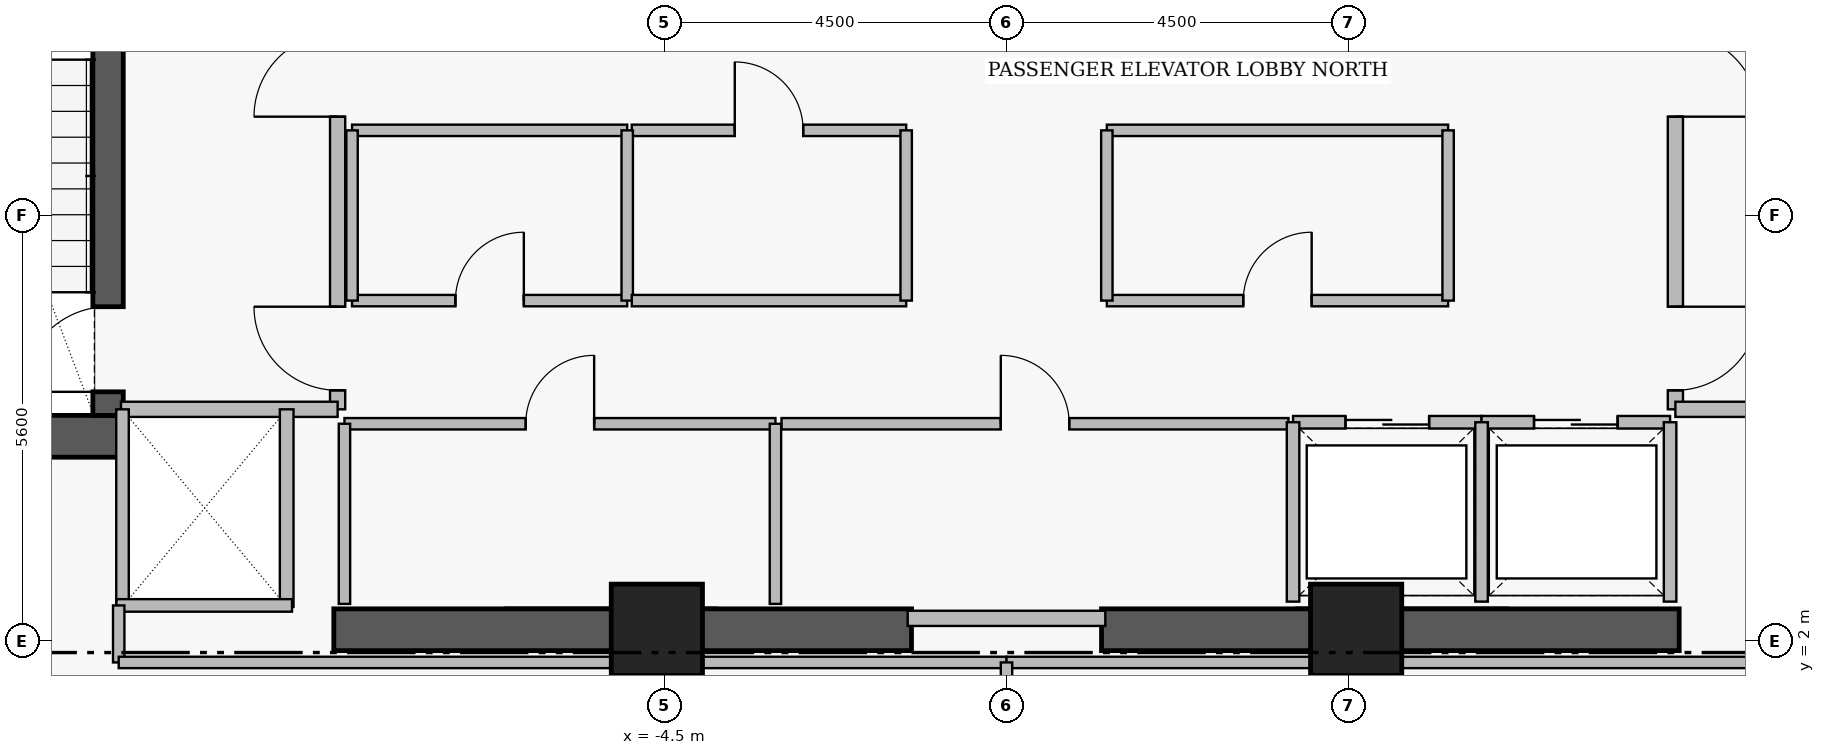
"""IFC4 building model, lengths in metres.
Left out: names, types, materials, properties, quantities, classifications, styles, units other than length and angle.
Written with IfcOpenShell. Run it as: python <this file> out.ifc"""

import sys

from ifc_helpers import new_model, si_unit, direction, frame, frame_2d, origin, origin_2d, place, context, subcontext, project, spatial, rectangle, extrude, element, fill, save


model = new_model("IFC4")
c1 = context("Model", 3, precision=1e-05, world=origin(), true_north=direction((0.0, 1.0)))
c2 = subcontext(c1, "Body", "Model", "MODEL_VIEW")
j1 = project(units=[si_unit("LENGTHUNIT", "METRE"), si_unit("PLANEANGLEUNIT", "RADIAN")], contexts=[c1])
p1 = place(None, origin())
s1 = spatial("IfcSite", under=j1, at=p1, CompositionType="ELEMENT")
p2 = place(p1, origin())
s2 = spatial("IfcBuilding", under=s1, at=p2, CompositionType="ELEMENT")
p3 = place(p2, frame((0.0, 0.0, 250.75)))
s3 = spatial("IfcBuildingStorey", under=s2, at=p3, CompositionType="ELEMENT", Elevation=250.75)
p4 = place(p3, frame((-15.96, 4.695, 0.0), z_axis=(0.0, 0.0, 1.0), x_axis=(1.0, 0.0, 0.0)))
e1 = element("IfcWall", 1, at=p4, inside=s3, PredefinedType="SHEAR", context=c2, shape_type="SweptSolid", body=[
    extrude(rectangle(XDim=4.36, YDim=0.55, at=frame_2d((2.18, 0.0))), origin(), (0.0, 0.0, 1.0), 3.51),
])
for number, where, z_axis, x_axis in (
    (2, (-8.85, 2.15, 0.0), (0.0, 0.0, 1.0), (1.0, 0.0, 0.0)),
    (3, (1.25, 2.15, 0.0), (0.0, 0.0, 1.0), (1.0, 0.0, 0.0)),
):
    element("IfcWall", number, at=place(p3, frame(where, z_axis=z_axis, x_axis=x_axis)), inside=s3, PredefinedType="SHEAR", context=c2, shape_type="SweptSolid", body=[
        extrude(rectangle(XDim=7.6, YDim=0.55, at=frame_2d((3.8, 0.0))), origin(), (0.0, 0.0, 1.0), 3.48),
    ])
p5 = place(p3, frame((-11.82, 4.97, 0.0), z_axis=(0.0, 0.0, 1.0), x_axis=(0.0, 1.0, 0.0)))
e4 = element("IfcWall", 4, at=p5, inside=s3, PredefinedType="SHEAR", context=c2, shape_type="SweptSolid", body=[
    extrude(rectangle(XDim=8.96, YDim=0.4, at=frame_2d((4.48, 0.0))), origin(), (0.0, 0.0, 1.0), 3.51),
])
p6 = place(p5, frame((0.31, 0.0, 0.0)))
e5 = element("IfcOpeningElement", 5, at=p6, cuts=e4, PredefinedType="OPENING", context=c2, shape_type="SweptSolid", body=[
    extrude(rectangle(XDim=1.12, YDim=2.22, at=frame_2d((0.56, 1.11))), frame((0.0, 0.21, 0.0), z_axis=(0.0, -1.0, 0.0), x_axis=(1.0, 0.0, 0.0)), (0.0, 0.0, 1.0), 0.42),
])
for number, where, z_axis, x_axis in (
    (6, (-4.6, 2.15, 0.0), (0.0, 0.0, 1.0), (1.0, 0.0, 0.0)),
    (7, (4.6, 2.15, 0.0), (0.0, 0.0, 1.0), (1.0, 0.0, 0.0)),
):
    element("IfcColumn", number, at=place(p3, frame(where, z_axis=z_axis, x_axis=x_axis)), inside=s3, PredefinedType="COLUMN", context=c2, shape_type="SweptSolid", body=[
        extrude(rectangle(XDim=1.2, YDim=1.2, at=origin_2d()), origin(), (0.0, 0.0, 1.0), 3.7),
    ])
p7 = place(p3, frame((-8.8, 5.05, 0.0), z_axis=(0.0, 0.0, 1.0), x_axis=(0.0, 1.0, 0.0)))
e8 = element("IfcWall", 8, at=p7, inside=s3, PredefinedType="PARTITIONING", context=c2, shape_type="SweptSolid", body=[
    extrude(rectangle(XDim=6.1, YDim=0.2, at=frame_2d((3.05, 0.0))), origin(), (0.0, 0.0, 1.0), 3.48),
])
p8 = place(p7, frame((0.25, 0.0, 0.0)))
e9 = element("IfcOpeningElement", 9, at=p8, cuts=e8, PredefinedType="OPENING", context=c2, shape_type="SweptSolid", body=[
    extrude(rectangle(XDim=1.1, YDim=2.2, at=frame_2d((0.55, 1.1))), frame((0.0, 0.11, 0.0), z_axis=(0.0, -1.0, 0.0), x_axis=(1.0, 0.0, 0.0)), (0.0, 0.0, 1.0), 0.22),
])
p9 = place(p7, frame((3.85, 0.0, 0.0)))
e10 = element("IfcOpeningElement", 10, at=p9, cuts=e8, PredefinedType="OPENING", context=c2, shape_type="SweptSolid", body=[
    extrude(rectangle(XDim=1.1, YDim=2.2, at=frame_2d((0.55, 1.1))), frame((0.0, 0.11, 0.0), z_axis=(0.0, -1.0, 0.0), x_axis=(1.0, 0.0, 0.0)), (0.0, 0.0, 1.0), 0.22),
])
p10 = place(p3, frame((8.8, 11.15, 0.0), z_axis=(0.0, 0.0, 1.0), x_axis=(0.0, -1.0, 0.0)))
e11 = element("IfcWall", 11, at=p10, inside=s3, PredefinedType="PARTITIONING", context=c2, shape_type="SweptSolid", body=[
    extrude(rectangle(XDim=6.1, YDim=0.2, at=frame_2d((3.05, 0.0))), origin(), (0.0, 0.0, 1.0), 3.48),
])
p11 = place(p10, frame((1.15, 0.0, 0.0)))
e12 = element("IfcOpeningElement", 12, at=p11, cuts=e11, PredefinedType="OPENING", context=c2, shape_type="SweptSolid", body=[
    extrude(rectangle(XDim=1.1, YDim=2.2, at=frame_2d((0.55, 1.1))), frame((0.0, 0.11, 0.0), z_axis=(0.0, -1.0, 0.0), x_axis=(1.0, 0.0, 0.0)), (0.0, 0.0, 1.0), 0.22),
])
p12 = place(p10, frame((4.75, 0.0, 0.0)))
e13 = element("IfcOpeningElement", 13, at=p12, cuts=e11, PredefinedType="OPENING", context=c2, shape_type="SweptSolid", body=[
    extrude(rectangle(XDim=1.1, YDim=2.2, at=frame_2d((0.55, 1.1))), frame((0.0, 0.11, 0.0), z_axis=(0.0, -1.0, 0.0), x_axis=(1.0, 0.0, 0.0)), (0.0, 0.0, 1.0), 0.22),
])
p13 = place(p3, frame((3.77, 4.88, 0.0), z_axis=(0.0, 0.0, 1.0), x_axis=(1.0, 0.0, 0.0)))
e14 = element("IfcWall", 14, at=p13, inside=s3, PredefinedType="PARTITIONING", context=c2, shape_type="SweptSolid", body=[
    extrude(rectangle(XDim=2.48, YDim=0.165, at=frame_2d((1.24, 0.0))), origin(), (0.0, 0.0, 1.0), 3.48),
])
p14 = place(p13, frame((0.69, 0.0, 0.0)))
e15 = element("IfcOpeningElement", 15, at=p14, cuts=e14, PredefinedType="OPENING", context=c2, shape_type="SweptSolid", body=[
    extrude(rectangle(XDim=1.1, YDim=2.25, at=frame_2d((0.55, 1.125))), frame((0.0, 0.093, 0.0), z_axis=(0.0, -1.0, 0.0), x_axis=(1.0, 0.0, 0.0)), (0.0, 0.0, 1.0), 0.185),
])
p15 = place(p3, frame((6.25, 4.88, 0.0), z_axis=(0.0, 0.0, 1.0), x_axis=(1.0, 0.0, 0.0)))
e16 = element("IfcWall", 16, at=p15, inside=s3, PredefinedType="PARTITIONING", context=c2, shape_type="SweptSolid", body=[
    extrude(rectangle(XDim=2.48, YDim=0.165, at=frame_2d((1.24, 0.0))), origin(), (0.0, 0.0, 1.0), 3.48),
])
p16 = place(p15, frame((0.69, 0.0, 0.0)))
e17 = element("IfcOpeningElement", 17, at=p16, cuts=e16, PredefinedType="OPENING", context=c2, shape_type="SweptSolid", body=[
    extrude(rectangle(XDim=1.1, YDim=2.25, at=frame_2d((0.55, 1.125))), frame((0.0, 0.093, 0.0), z_axis=(0.0, -1.0, 0.0), x_axis=(1.0, 0.0, 0.0)), (0.0, 0.0, 1.0), 0.185),
])
p17 = place(p3, frame((-8.71, 4.86, 0.0), z_axis=(0.0, 0.0, 1.0), x_axis=(1.0, 0.0, 0.0)))
e18 = element("IfcWall", 18, at=p17, inside=s3, PredefinedType="PARTITIONING", context=c2, shape_type="SweptSolid", body=[
    extrude(rectangle(XDim=5.67, YDim=0.15, at=frame_2d((2.835, 0.0))), origin(), (0.0, 0.0, 1.0), 3.48),
])
p18 = place(p17, frame((2.385, 0.0, 0.0)))
e19 = element("IfcOpeningElement", 19, at=p18, cuts=e18, PredefinedType="OPENING", context=c2, shape_type="SweptSolid", body=[
    extrude(rectangle(XDim=0.9, YDim=2.15, at=frame_2d((0.45, 1.075))), frame((0.0, 0.085, 0.0), z_axis=(0.0, -1.0, 0.0), x_axis=(1.0, 0.0, 0.0)), (0.0, 0.0, 1.0), 0.17),
])
p19 = place(p3, frame((-2.96, 4.86, 0.0), z_axis=(0.0, 0.0, 1.0), x_axis=(1.0, 0.0, 0.0)))
e20 = element("IfcWall", 20, at=p19, inside=s3, PredefinedType="PARTITIONING", context=c2, shape_type="SweptSolid", body=[
    extrude(rectangle(XDim=6.67, YDim=0.15, at=frame_2d((3.335, 0.0))), origin(), (0.0, 0.0, 1.0), 3.48),
])
p20 = place(p19, frame((2.885, 0.0, 0.0)))
e21 = element("IfcOpeningElement", 21, at=p20, cuts=e20, PredefinedType="OPENING", context=c2, shape_type="SweptSolid", body=[
    extrude(rectangle(XDim=0.9, YDim=2.15, at=frame_2d((0.45, 1.075))), frame((0.0, 0.085, 0.0), z_axis=(0.0, -1.0, 0.0), x_axis=(1.0, 0.0, 0.0)), (0.0, 0.0, 1.0), 0.17),
])
p21 = place(p3, frame((-8.61, 6.48, 0.0), z_axis=(0.0, 0.0, 1.0), x_axis=(1.0, 0.0, 0.0)))
e22 = element("IfcWall", 22, at=p21, inside=s3, PredefinedType="PARTITIONING", context=c2, shape_type="SweptSolid", body=[
    extrude(rectangle(XDim=3.62, YDim=0.15, at=frame_2d((1.81, 0.0))), origin(), (0.0, 0.0, 1.0), 3.48),
])
p22 = place(p21, frame((1.36, 0.0, 0.0)))
e23 = element("IfcOpeningElement", 23, at=p22, cuts=e22, PredefinedType="OPENING", context=c2, shape_type="SweptSolid", body=[
    extrude(rectangle(XDim=0.9, YDim=2.15, at=frame_2d((0.45, 1.075))), frame((0.0, 0.085, 0.0), z_axis=(0.0, -1.0, 0.0), x_axis=(1.0, 0.0, 0.0)), (0.0, 0.0, 1.0), 0.17),
])
p23 = place(p3, frame((-4.93, 8.72, 0.0), z_axis=(0.0, 0.0, 1.0), x_axis=(1.0, 0.0, 0.0)))
e24 = element("IfcWall", 24, at=p23, inside=s3, PredefinedType="PARTITIONING", context=c2, shape_type="SweptSolid", body=[
    extrude(rectangle(XDim=3.61, YDim=0.15, at=frame_2d((1.805, 0.0))), origin(), (0.0, 0.0, 1.0), 3.48),
])
p24 = place(p23, frame((1.355, 0.0, 0.0)))
e25 = element("IfcOpeningElement", 25, at=p24, cuts=e24, PredefinedType="OPENING", context=c2, shape_type="SweptSolid", body=[
    extrude(rectangle(XDim=0.9, YDim=2.15, at=frame_2d((0.45, 1.075))), frame((0.0, 0.085, 0.0), z_axis=(0.0, -1.0, 0.0), x_axis=(1.0, 0.0, 0.0)), (0.0, 0.0, 1.0), 0.17),
])
p25 = place(p3, frame((1.32, 6.48, 0.0), z_axis=(0.0, 0.0, 1.0), x_axis=(1.0, 0.0, 0.0)))
e26 = element("IfcWall", 26, at=p25, inside=s3, PredefinedType="PARTITIONING", context=c2, shape_type="SweptSolid", body=[
    extrude(rectangle(XDim=4.49, YDim=0.15, at=frame_2d((2.245, 0.0))), origin(), (0.0, 0.0, 1.0), 3.48),
])
p26 = place(p25, frame((1.795, 0.0, 0.0)))
e27 = element("IfcOpeningElement", 27, at=p26, cuts=e26, PredefinedType="OPENING", context=c2, shape_type="SweptSolid", body=[
    extrude(rectangle(XDim=0.9, YDim=2.15, at=frame_2d((0.45, 1.075))), frame((0.0, 0.085, 0.0), z_axis=(0.0, -1.0, 0.0), x_axis=(1.0, 0.0, 0.0)), (0.0, 0.0, 1.0), 0.17),
])
for number, where, z_axis, x_axis in (
    (28, (-11.65, 5.05, 0.0), (0.0, 0.0, 1.0), (1.0, 0.0, 0.0)),
    (29, (8.8, 5.05, 0.0), (0.0, 0.0, 1.0), (1.0, 0.0, 0.0)),
):
    element("IfcWall", number, at=place(p3, frame(where, z_axis=z_axis, x_axis=x_axis)), inside=s3, PredefinedType="PARTITIONING", context=c2, shape_type="SweptSolid", body=[
        extrude(rectangle(XDim=2.85, YDim=0.2, at=frame_2d((1.425, 0.0))), origin(), (0.0, 0.0, 1.0), 3.48),
    ])
for number, where, z_axis, x_axis in (
    (30, (3.77, 2.52, 0.0), (0.0, 0.0, 1.0), (0.0, 1.0, 0.0)),
    (31, (6.25, 2.52, 0.0), (0.0, 0.0, 1.0), (0.0, 1.0, 0.0)),
    (32, (8.73, 2.52, 0.0), (0.0, 0.0, 1.0), (0.0, 1.0, 0.0)),
):
    element("IfcWall", number, at=place(p3, frame(where, z_axis=z_axis, x_axis=x_axis)), inside=s3, PredefinedType="PARTITIONING", context=c2, shape_type="SweptSolid", body=[
        extrude(rectangle(XDim=2.36, YDim=0.165, at=frame_2d((1.18, 0.0))), origin(), (0.0, 0.0, 1.0), 3.48),
    ])
p27 = place(p3, frame((-1.3, 2.3, 0.0), z_axis=(0.0, 0.0, 1.0), x_axis=(1.0, 0.0, 0.0)))
e33 = element("IfcWall", 33, at=p27, inside=s3, PredefinedType="PARTITIONING", context=c2, shape_type="SweptSolid", body=[
    extrude(rectangle(XDim=2.6, YDim=0.2, at=frame_2d((1.3, 0.0))), origin(), (0.0, 0.0, 1.0), 2.38),
])
for number, where, z_axis, x_axis in (
    (34, (-8.71, 2.49, 0.0), (0.0, 0.0, 1.0), (0.0, 1.0, 0.0)),
    (35, (-3.04, 2.49, 0.0), (0.0, 0.0, 1.0), (0.0, 1.0, 0.0)),
):
    element("IfcWall", number, at=place(p3, frame(where, z_axis=z_axis, x_axis=x_axis)), inside=s3, PredefinedType="PARTITIONING", context=c2, shape_type="SweptSolid", body=[
        extrude(rectangle(XDim=2.37, YDim=0.15, at=frame_2d((1.185, 0.0))), origin(), (0.0, 0.0, 1.0), 3.48),
    ])
p28 = place(p3, frame((-9.47, 2.45, 0.0), z_axis=(0.0, 0.0, 1.0), x_axis=(0.0, 1.0, 0.0)))
e36 = element("IfcWall", 36, at=p28, inside=s3, PredefinedType="PARTITIONING", context=c2, shape_type="SweptSolid", body=[
    extrude(rectangle(XDim=2.6, YDim=0.18, at=frame_2d((1.3, 0.0))), origin(), (0.0, 0.0, 1.0), 3.48),
])
p29 = place(p3, frame((-11.63, 2.47, 0.0), z_axis=(0.0, 0.0, 1.0), x_axis=(0.0, 1.0, 0.0)))
e37 = element("IfcWall", 37, at=p29, inside=s3, PredefinedType="PARTITIONING", context=c2, shape_type="SweptSolid", body=[
    extrude(rectangle(XDim=2.58, YDim=0.165, at=frame_2d((1.29, 0.0))), origin(), (0.0, 0.0, 1.0), 3.48),
])
p30 = place(p3, frame((-11.71, 2.47, 0.0), z_axis=(0.0, 0.0, 1.0), x_axis=(1.0, 0.0, 0.0)))
e38 = element("IfcWall", 38, at=p30, inside=s3, PredefinedType="PARTITIONING", context=c2, shape_type="SweptSolid", body=[
    extrude(rectangle(XDim=2.31, YDim=0.165, at=frame_2d((1.155, 0.0))), origin(), (0.0, 0.0, 1.0), 2.38),
])
p31 = place(p3, frame((-8.61, 8.72, 0.0), z_axis=(0.0, 0.0, 1.0), x_axis=(1.0, 0.0, 0.0)))
e39 = element("IfcWall", 39, at=p31, inside=s3, PredefinedType="PARTITIONING", context=c2, shape_type="SweptSolid", body=[
    extrude(rectangle(XDim=3.62, YDim=0.15, at=frame_2d((1.81, 0.0))), origin(), (0.0, 0.0, 1.0), 3.48),
])
for number, where, z_axis, x_axis in (
    (40, (-8.61, 6.48, 0.0), (0.0, 0.0, 1.0), (0.0, 1.0, 0.0)),
    (41, (-4.99, 6.48, 0.0), (0.0, 0.0, 1.0), (0.0, 1.0, 0.0)),
):
    element("IfcWall", number, at=place(p3, frame(where, z_axis=z_axis, x_axis=x_axis)), inside=s3, PredefinedType="PARTITIONING", context=c2, shape_type="SweptSolid", body=[
        extrude(rectangle(XDim=2.24, YDim=0.15, at=frame_2d((1.12, 0.0))), origin(), (0.0, 0.0, 1.0), 3.48),
    ])
p32 = place(p3, frame((-4.93, 6.48, 0.0), z_axis=(0.0, 0.0, 1.0), x_axis=(1.0, 0.0, 0.0)))
e42 = element("IfcWall", 42, at=p32, inside=s3, PredefinedType="PARTITIONING", context=c2, shape_type="SweptSolid", body=[
    extrude(rectangle(XDim=3.61, YDim=0.15, at=frame_2d((1.805, 0.0))), origin(), (0.0, 0.0, 1.0), 3.48),
])
p33 = place(p3, frame((-1.32, 6.48, 0.0), z_axis=(0.0, 0.0, 1.0), x_axis=(0.0, 1.0, 0.0)))
e43 = element("IfcWall", 43, at=p33, inside=s3, PredefinedType="PARTITIONING", context=c2, shape_type="SweptSolid", body=[
    extrude(rectangle(XDim=2.24, YDim=0.15, at=frame_2d((1.12, 0.0))), origin(), (0.0, 0.0, 1.0), 3.48),
])
p34 = place(p3, frame((1.32, 8.72, 0.0), z_axis=(0.0, 0.0, 1.0), x_axis=(1.0, 0.0, 0.0)))
e44 = element("IfcWall", 44, at=p34, inside=s3, PredefinedType="PARTITIONING", context=c2, shape_type="SweptSolid", body=[
    extrude(rectangle(XDim=4.49, YDim=0.15, at=frame_2d((2.245, 0.0))), origin(), (0.0, 0.0, 1.0), 3.48),
])
for number, where, z_axis, x_axis in (
    (45, (1.32, 6.48, 0.0), (0.0, 0.0, 1.0), (0.0, 1.0, 0.0)),
    (46, (5.81, 6.48, 0.0), (0.0, 0.0, 1.0), (0.0, 1.0, 0.0)),
):
    element("IfcWall", number, at=place(p3, frame(where, z_axis=z_axis, x_axis=x_axis)), inside=s3, PredefinedType="PARTITIONING", context=c2, shape_type="SweptSolid", body=[
        extrude(rectangle(XDim=2.24, YDim=0.15, at=frame_2d((1.12, 0.0))), origin(), (0.0, 0.0, 1.0), 3.48),
    ])
p35 = place(p3, frame((-11.68, 1.72, 0.0), z_axis=(0.0, 0.0, 1.0), x_axis=(0.0, 1.0, 0.0)))
e47 = element("IfcWall", 47, at=p35, inside=s3, PredefinedType="PARTITIONING", context=c2, shape_type="SweptSolid", body=[
    extrude(rectangle(XDim=0.75, YDim=0.15, at=frame_2d((0.375, 0.0))), origin(), (0.0, 0.0, 1.0), 3.48),
])
for number, where, z_axis, x_axis in (
    (48, (-11.68, 1.72, 0.0), (0.0, 0.0, 1.0), (1.0, 0.0, 0.0)),
    (49, (0.0, 1.72, 0.0), (0.0, 0.0, 1.0), (1.0, 0.0, 0.0)),
):
    element("IfcWall", number, at=place(p3, frame(where, z_axis=z_axis, x_axis=x_axis)), inside=s3, PredefinedType="PARTITIONING", context=c2, shape_type="SweptSolid", body=[
        extrude(rectangle(XDim=11.68, YDim=0.15, at=frame_2d((5.84, 0.0))), origin(), (0.0, 0.0, 1.0), 2.38),
    ])
p36 = place(p3, frame((0.0, 0.06, 0.0), z_axis=(0.0, 0.0, 1.0), x_axis=(0.0, 1.0, 0.0)))
e50 = element("IfcWall", 50, at=p36, inside=s3, PredefinedType="PARTITIONING", context=c2, shape_type="SweptSolid", body=[
    extrude(rectangle(XDim=1.66, YDim=0.15, at=frame_2d((0.83, 0.0))), origin(), (0.0, 0.0, 1.0), 3.48),
])
p37 = place(p6, origin())
e51 = element("IfcDoor", 51, at=p37, inside=s3, OperationType="SINGLE_SWING_LEFT", PredefinedType="DOOR", context=c2, shape_type="SweptSolid", body=[
    extrude(rectangle(XDim=1.12, YDim=2.22, at=frame_2d((0.56, 1.11))), frame((0.0, 0.025, 0.0), z_axis=(0.0, -1.0, 0.0), x_axis=(1.0, 0.0, 0.0)), (0.0, 0.0, 1.0), 0.05),
])
fill(e5, e51)
p38 = place(p8, origin())
e52 = element("IfcDoor", 52, at=p38, inside=s3, OperationType="SINGLE_SWING_RIGHT", PredefinedType="DOOR", context=c2, shape_type="SweptSolid", body=[
    extrude(rectangle(XDim=1.1, YDim=2.2, at=frame_2d((0.55, 1.1))), frame((0.0, 0.025, 0.0), z_axis=(0.0, -1.0, 0.0), x_axis=(1.0, 0.0, 0.0)), (0.0, 0.0, 1.0), 0.05),
])
fill(e9, e52)
p39 = place(p9, origin())
e53 = element("IfcDoor", 53, at=p39, inside=s3, OperationType="SINGLE_SWING_LEFT", PredefinedType="DOOR", context=c2, shape_type="SweptSolid", body=[
    extrude(rectangle(XDim=1.1, YDim=2.2, at=frame_2d((0.55, 1.1))), frame((0.0, 0.025, 0.0), z_axis=(0.0, -1.0, 0.0), x_axis=(1.0, 0.0, 0.0)), (0.0, 0.0, 1.0), 0.05),
])
fill(e10, e53)
p40 = place(p11, origin())
e54 = element("IfcDoor", 54, at=p40, inside=s3, OperationType="SINGLE_SWING_RIGHT", PredefinedType="DOOR", context=c2, shape_type="SweptSolid", body=[
    extrude(rectangle(XDim=1.1, YDim=2.2, at=frame_2d((0.55, 1.1))), frame((0.0, 0.025, 0.0), z_axis=(0.0, -1.0, 0.0), x_axis=(1.0, 0.0, 0.0)), (0.0, 0.0, 1.0), 0.05),
])
fill(e12, e54)
p41 = place(p12, origin())
e55 = element("IfcDoor", 55, at=p41, inside=s3, OperationType="SINGLE_SWING_LEFT", PredefinedType="DOOR", context=c2, shape_type="SweptSolid", body=[
    extrude(rectangle(XDim=1.1, YDim=2.2, at=frame_2d((0.55, 1.1))), frame((0.0, 0.025, 0.0), z_axis=(0.0, -1.0, 0.0), x_axis=(1.0, 0.0, 0.0)), (0.0, 0.0, 1.0), 0.05),
])
fill(e13, e55)
p42 = place(p14, origin())
e56 = element("IfcDoor", 56, at=p42, inside=s3, OperationType="SLIDING_TO_LEFT", PredefinedType="DOOR", context=c2, shape_type="SweptSolid", body=[
    extrude(rectangle(XDim=1.1, YDim=2.25, at=frame_2d((0.55, 1.125))), frame((0.0, 0.025, 0.0), z_axis=(0.0, -1.0, 0.0), x_axis=(1.0, 0.0, 0.0)), (0.0, 0.0, 1.0), 0.05),
])
fill(e15, e56)
p43 = place(p16, origin())
e57 = element("IfcDoor", 57, at=p43, inside=s3, OperationType="SLIDING_TO_LEFT", PredefinedType="DOOR", context=c2, shape_type="SweptSolid", body=[
    extrude(rectangle(XDim=1.1, YDim=2.25, at=frame_2d((0.55, 1.125))), frame((0.0, 0.025, 0.0), z_axis=(0.0, -1.0, 0.0), x_axis=(1.0, 0.0, 0.0)), (0.0, 0.0, 1.0), 0.05),
])
fill(e17, e57)
p44 = place(p18, origin())
e58 = element("IfcDoor", 58, at=p44, inside=s3, OperationType="SINGLE_SWING_RIGHT", PredefinedType="DOOR", context=c2, shape_type="SweptSolid", body=[
    extrude(rectangle(XDim=0.9, YDim=2.15, at=frame_2d((0.45, 1.075))), frame((0.0, 0.025, 0.0), z_axis=(0.0, -1.0, 0.0), x_axis=(1.0, 0.0, 0.0)), (0.0, 0.0, 1.0), 0.05),
])
fill(e19, e58)
p45 = place(p20, origin())
e59 = element("IfcDoor", 59, at=p45, inside=s3, OperationType="SINGLE_SWING_LEFT", PredefinedType="DOOR", context=c2, shape_type="SweptSolid", body=[
    extrude(rectangle(XDim=0.9, YDim=2.15, at=frame_2d((0.45, 1.075))), frame((0.0, 0.025, 0.0), z_axis=(0.0, -1.0, 0.0), x_axis=(1.0, 0.0, 0.0)), (0.0, 0.0, 1.0), 0.05),
])
fill(e21, e59)
p46 = place(p22, origin())
e60 = element("IfcDoor", 60, at=p46, inside=s3, OperationType="SINGLE_SWING_RIGHT", PredefinedType="DOOR", context=c2, shape_type="SweptSolid", body=[
    extrude(rectangle(XDim=0.9, YDim=2.15, at=frame_2d((0.45, 1.075))), frame((0.0, 0.025, 0.0), z_axis=(0.0, -1.0, 0.0), x_axis=(1.0, 0.0, 0.0)), (0.0, 0.0, 1.0), 0.05),
])
fill(e23, e60)
p47 = place(p24, origin())
e61 = element("IfcDoor", 61, at=p47, inside=s3, OperationType="SINGLE_SWING_LEFT", PredefinedType="DOOR", context=c2, shape_type="SweptSolid", body=[
    extrude(rectangle(XDim=0.9, YDim=2.15, at=frame_2d((0.45, 1.075))), frame((0.0, 0.025, 0.0), z_axis=(0.0, -1.0, 0.0), x_axis=(1.0, 0.0, 0.0)), (0.0, 0.0, 1.0), 0.05),
])
fill(e25, e61)
p48 = place(p26, origin())
e62 = element("IfcDoor", 62, at=p48, inside=s3, OperationType="SINGLE_SWING_RIGHT", PredefinedType="DOOR", context=c2, shape_type="SweptSolid", body=[
    extrude(rectangle(XDim=0.9, YDim=2.15, at=frame_2d((0.45, 1.075))), frame((0.0, 0.025, 0.0), z_axis=(0.0, -1.0, 0.0), x_axis=(1.0, 0.0, 0.0)), (0.0, 0.0, 1.0), 0.05),
])
fill(e27, e62)
save(model, sys.argv[1])
